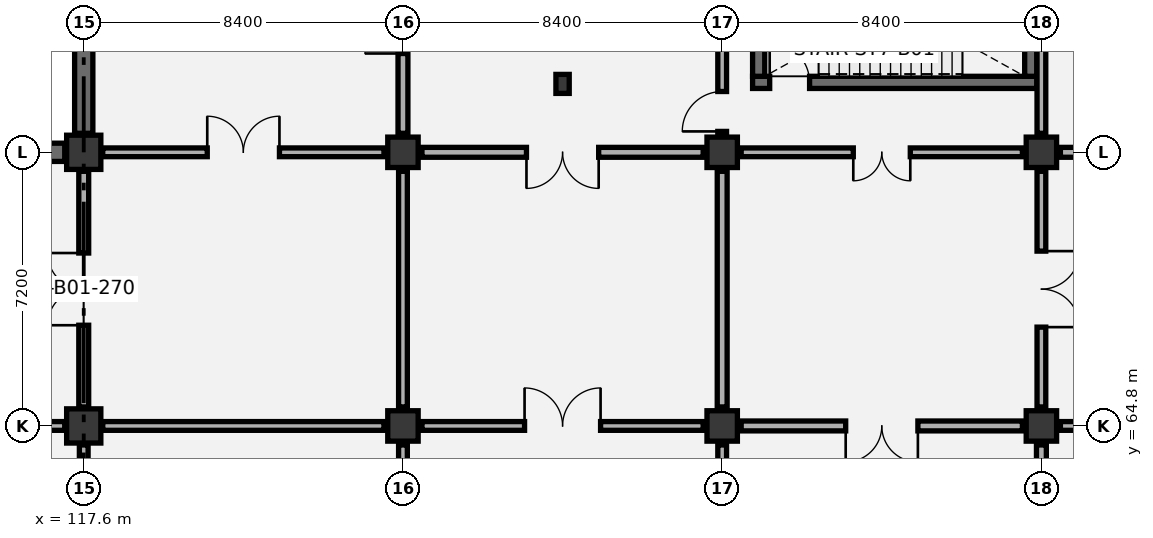
"""IFC4 building model, lengths in metres.
Left out: names, types, materials, properties, quantities, classifications, styles, units other than length and angle.
Written with IfcOpenShell. Run it as: python <this file> out.ifc"""

import sys

from ifc_helpers import new_model, si_unit, direction, frame, frame_2d, origin, origin_2d, place, context, subcontext, project, spatial, rectangle, extrude, element, fill, save


model = new_model("IFC4")
c1 = context("Model", 3, precision=1e-05, world=origin(), true_north=direction((0.0, 1.0)))
c2 = subcontext(c1, "Body", "Model", "MODEL_VIEW")
j1 = project(units=[si_unit("LENGTHUNIT", "METRE"), si_unit("PLANEANGLEUNIT", "RADIAN")], contexts=[c1])
p1 = place(None, origin())
s1 = spatial("IfcSite", under=j1, at=p1, CompositionType="ELEMENT")
p2 = place(p1, origin())
s2 = spatial("IfcBuilding", under=s1, at=p2, CompositionType="ELEMENT")
p3 = place(p2, frame((0.0, 0.0, -4.8)))
s3 = spatial("IfcBuildingStorey", under=s2, at=p3, CompositionType="ELEMENT", Elevation=-4.8)
for number, where, z_axis, x_axis in (
    (1, (117.6, 64.8, 0.0), (0.0, 0.0, 1.0), (1.0, 0.0, 0.0)),
    (2, (117.6, 72.0, 0.0), (0.0, 0.0, 1.0), (1.0, 0.0, 0.0)),
):
    element("IfcColumn", number, at=place(p3, frame(where, z_axis=z_axis, x_axis=x_axis)), inside=s3, PredefinedType="COLUMN", context=c2, shape_type="SweptSolid", body=[
        extrude(rectangle(XDim=0.9, YDim=0.9, at=origin_2d()), origin(), (0.0, 0.0, 1.0), 4.8),
    ])
for number, where, z_axis, x_axis in (
    (3, (126.0, 64.8, 0.0), (0.0, 0.0, 1.0), (1.0, 0.0, 0.0)),
    (4, (126.0, 72.0, 0.0), (0.0, 0.0, 1.0), (1.0, 0.0, 0.0)),
    (5, (134.4, 64.8, 0.0), (0.0, 0.0, 1.0), (1.0, 0.0, 0.0)),
    (6, (134.4, 72.0, 0.0), (0.0, 0.0, 1.0), (1.0, 0.0, 0.0)),
    (7, (142.8, 64.8, 0.0), (0.0, 0.0, 1.0), (1.0, 0.0, 0.0)),
    (8, (142.8, 72.0, 0.0), (0.0, 0.0, 1.0), (1.0, 0.0, 0.0)),
):
    element("IfcColumn", number, at=place(p3, frame(where, z_axis=z_axis, x_axis=x_axis)), inside=s3, PredefinedType="COLUMN", context=c2, shape_type="SweptSolid", body=[
        extrude(rectangle(XDim=0.8, YDim=0.8, at=origin_2d()), origin(), (0.0, 0.0, 1.0), 4.8),
    ])
p4 = place(p3, frame((130.2, 73.8, 0.0), z_axis=(0.0, 0.0, 1.0), x_axis=(1.0, 0.0, 0.0)))
e9 = element("IfcColumn", 9, at=p4, inside=s3, PredefinedType="PILASTER", context=c2, shape_type="SweptSolid", body=[
    extrude(rectangle(XDim=0.35, YDim=0.5, at=origin_2d()), origin(), (0.0, 0.0, 1.0), 4.8),
])
p5 = place(p3, frame((109.7, 72.0, 0.0), z_axis=(0.0, 0.0, 1.0), x_axis=(1.0, 0.0, 0.0)))
e10 = element("IfcWall", 10, at=p5, inside=s3, PredefinedType="USERDEFINED", context=c2, shape_type="SweptSolid", body=[
    extrude(rectangle(XDim=7.4, YDim=0.48, at=frame_2d((3.7, 0.0))), origin(), (0.0, 0.0, 1.0), 4.45),
])
p6 = place(p3, frame((117.6, 72.5, 0.0), z_axis=(0.0, 0.0, 1.0), x_axis=(0.0, 1.0, 0.0)))
e11 = element("IfcWall", 11, at=p6, inside=s3, PredefinedType="USERDEFINED", context=c2, shape_type="SweptSolid", body=[
    extrude(rectangle(XDim=6.2, YDim=0.48, at=frame_2d((3.1, 0.0))), origin(), (0.0, 0.0, 1.0), 4.575),
])
p7 = place(p3, frame((135.2, 73.84, 0.0), z_axis=(0.0, 0.0, 1.0), x_axis=(1.0, 0.0, 0.0)))
e12 = element("IfcWall", 12, at=p7, inside=s3, PredefinedType="SHEAR", context=c2, shape_type="SweptSolid", body=[
    extrude(rectangle(XDim=7.48, YDim=0.32, at=frame_2d((3.74, 0.0))), origin(), (0.0, 0.0, 1.0), 4.45),
])
p8 = place(p7, frame((0.45, 0.0, 0.0)))
e13 = element("IfcOpeningElement", 13, at=p8, cuts=e12, PredefinedType="OPENING", context=c2, shape_type="SweptSolid", body=[
    extrude(rectangle(XDim=1.05, YDim=2.15, at=frame_2d((0.525, 1.075))), frame((0.0, 0.17, 0.0), z_axis=(0.0, -1.0, 0.0), x_axis=(1.0, 0.0, 0.0)), (0.0, 0.0, 1.0), 0.34),
])
for number, where, z_axis, x_axis in (
    (14, (135.36, 74.0, 0.0), (0.0, 0.0, 1.0), (0.0, 1.0, 0.0)),
    (15, (142.52, 74.0, 0.0), (0.0, 0.0, 1.0), (0.0, 1.0, 0.0)),
):
    element("IfcWall", number, at=place(p3, frame(where, z_axis=z_axis, x_axis=x_axis)), inside=s3, PredefinedType="SHEAR", context=c2, shape_type="SweptSolid", body=[
        extrude(rectangle(XDim=3.8, YDim=0.32, at=frame_2d((1.9, 0.0))), origin(), (0.0, 0.0, 1.0), 4.45),
    ])
p9 = place(p3, frame((117.6, 58.1, 0.0), z_axis=(0.0, 0.0, 1.0), x_axis=(0.0, 1.0, 0.0)))
e16 = element("IfcWall", 16, at=p9, inside=s3, PredefinedType="PARTITIONING", context=c2, shape_type="SweptSolid", body=[
    extrude(rectangle(XDim=6.2, YDim=0.23, at=frame_2d((3.1, 0.0))), origin(), (0.0, 0.0, 1.0), 3.645),
])
p10 = place(p3, frame((109.7, 64.8, 0.0), z_axis=(0.0, 0.0, 1.0), x_axis=(1.0, 0.0, 0.0)))
e17 = element("IfcWall", 17, at=p10, inside=s3, PredefinedType="PARTITIONING", context=c2, shape_type="SweptSolid", body=[
    extrude(rectangle(XDim=7.4, YDim=0.23, at=frame_2d((3.7, 0.0))), origin(), (0.0, 0.0, 1.0), 3.545),
])
p11 = place(p3, frame((117.6, 65.3, 0.0), z_axis=(0.0, 0.0, 1.0), x_axis=(0.0, 1.0, 0.0)))
e18 = element("IfcWall", 18, at=p11, inside=s3, PredefinedType="PARTITIONING", context=c2, shape_type="SweptSolid", body=[
    extrude(rectangle(XDim=6.2, YDim=0.26, at=frame_2d((3.1, 0.0))), origin(), (0.0, 0.0, 1.0), 3.645),
])
p12 = place(p11, frame((2.15, 0.0, 0.0)))
e19 = element("IfcOpeningElement", 19, at=p12, cuts=e18, PredefinedType="OPENING", context=c2, shape_type="SweptSolid", body=[
    extrude(rectangle(XDim=1.9, YDim=2.3, at=frame_2d((0.95, 1.15))), frame((0.0, 0.14, 0.0), z_axis=(0.0, -1.0, 0.0), x_axis=(1.0, 0.0, 0.0)), (0.0, 0.0, 1.0), 0.28),
])
p13 = place(p3, frame((126.0, 58.1, 0.0), z_axis=(0.0, 0.0, 1.0), x_axis=(0.0, 1.0, 0.0)))
e20 = element("IfcWall", 20, at=p13, inside=s3, PredefinedType="PARTITIONING", context=c2, shape_type="SweptSolid", body=[
    extrude(rectangle(XDim=6.2, YDim=0.23, at=frame_2d((3.1, 0.0))), origin(), (0.0, 0.0, 1.0), 3.645),
])
p14 = place(p3, frame((118.1, 64.8, 0.0), z_axis=(0.0, 0.0, 1.0), x_axis=(1.0, 0.0, 0.0)))
e21 = element("IfcWall", 21, at=p14, inside=s3, PredefinedType="PARTITIONING", context=c2, shape_type="SweptSolid", body=[
    extrude(rectangle(XDim=7.4, YDim=0.23, at=frame_2d((3.7, 0.0))), origin(), (0.0, 0.0, 1.0), 3.545),
])
p15 = place(p3, frame((126.0, 65.3, 0.0), z_axis=(0.0, 0.0, 1.0), x_axis=(0.0, 1.0, 0.0)))
e22 = element("IfcWall", 22, at=p15, inside=s3, PredefinedType="PARTITIONING", context=c2, shape_type="SweptSolid", body=[
    extrude(rectangle(XDim=6.2, YDim=0.23, at=frame_2d((3.1, 0.0))), origin(), (0.0, 0.0, 1.0), 3.645),
])
p16 = place(p3, frame((118.1, 72.0, 0.0), z_axis=(0.0, 0.0, 1.0), x_axis=(1.0, 0.0, 0.0)))
e23 = element("IfcWall", 23, at=p16, inside=s3, PredefinedType="PARTITIONING", context=c2, shape_type="SweptSolid", body=[
    extrude(rectangle(XDim=7.4, YDim=0.23, at=frame_2d((3.7, 0.0))), origin(), (0.0, 0.0, 1.0), 3.545),
])
p17 = place(p16, frame((2.75, 0.0, 0.0)))
e24 = element("IfcOpeningElement", 24, at=p17, cuts=e23, PredefinedType="OPENING", context=c2, shape_type="SweptSolid", body=[
    extrude(rectangle(XDim=1.9, YDim=2.3, at=frame_2d((0.95, 1.15))), frame((0.0, 0.125, 0.0), z_axis=(0.0, -1.0, 0.0), x_axis=(1.0, 0.0, 0.0)), (0.0, 0.0, 1.0), 0.25),
])
p18 = place(p3, frame((126.0, 72.5, 0.0), z_axis=(0.0, 0.0, 1.0), x_axis=(0.0, 1.0, 0.0)))
e25 = element("IfcWall", 25, at=p18, inside=s3, PredefinedType="PARTITIONING", context=c2, shape_type="SweptSolid", body=[
    extrude(rectangle(XDim=6.2, YDim=0.26, at=frame_2d((3.1, 0.0))), origin(), (0.0, 0.0, 1.0), 3.645),
])
p19 = place(p18, frame((2.1, 0.0, 0.0)))
e26 = element("IfcOpeningElement", 26, at=p19, cuts=e25, PredefinedType="OPENING", context=c2, shape_type="SweptSolid", body=[
    extrude(rectangle(XDim=2.0, YDim=2.35, at=frame_2d((1.0, 1.175))), frame((0.0, 0.14, 0.0), z_axis=(0.0, -1.0, 0.0), x_axis=(1.0, 0.0, 0.0)), (0.0, 0.0, 1.0), 0.28),
])
p20 = place(p3, frame((134.4, 58.1, 0.0), z_axis=(0.0, 0.0, 1.0), x_axis=(0.0, 1.0, 0.0)))
e27 = element("IfcWall", 27, at=p20, inside=s3, PredefinedType="PARTITIONING", context=c2, shape_type="SweptSolid", body=[
    extrude(rectangle(XDim=6.2, YDim=0.23, at=frame_2d((3.1, 0.0))), origin(), (0.0, 0.0, 1.0), 3.645),
])
p21 = place(p3, frame((126.5, 64.8, 0.0), z_axis=(0.0, 0.0, 1.0), x_axis=(1.0, 0.0, 0.0)))
e28 = element("IfcWall", 28, at=p21, inside=s3, PredefinedType="PARTITIONING", context=c2, shape_type="SweptSolid", body=[
    extrude(rectangle(XDim=7.4, YDim=0.23, at=frame_2d((3.7, 0.0))), origin(), (0.0, 0.0, 1.0), 3.545),
])
p22 = place(p21, frame((2.7, 0.0, 0.0)))
e29 = element("IfcOpeningElement", 29, at=p22, cuts=e28, PredefinedType="OPENING", context=c2, shape_type="SweptSolid", body=[
    extrude(rectangle(XDim=2.0, YDim=2.35, at=frame_2d((1.0, 1.175))), frame((0.0, 0.125, 0.0), z_axis=(0.0, -1.0, 0.0), x_axis=(1.0, 0.0, 0.0)), (0.0, 0.0, 1.0), 0.25),
])
p23 = place(p3, frame((134.4, 65.3, 0.0), z_axis=(0.0, 0.0, 1.0), x_axis=(0.0, 1.0, 0.0)))
e30 = element("IfcWall", 30, at=p23, inside=s3, PredefinedType="PARTITIONING", context=c2, shape_type="SweptSolid", body=[
    extrude(rectangle(XDim=6.2, YDim=0.26, at=frame_2d((3.1, 0.0))), origin(), (0.0, 0.0, 1.0), 3.645),
])
p24 = place(p3, frame((126.5, 72.0, 0.0), z_axis=(0.0, 0.0, 1.0), x_axis=(1.0, 0.0, 0.0)))
e31 = element("IfcWall", 31, at=p24, inside=s3, PredefinedType="PARTITIONING", context=c2, shape_type="SweptSolid", body=[
    extrude(rectangle(XDim=7.4, YDim=0.26, at=frame_2d((3.7, 0.0))), origin(), (0.0, 0.0, 1.0), 3.545),
])
p25 = place(p24, frame((2.75, 0.0, 0.0)))
e32 = element("IfcOpeningElement", 32, at=p25, cuts=e31, PredefinedType="OPENING", context=c2, shape_type="SweptSolid", body=[
    extrude(rectangle(XDim=1.9, YDim=2.3, at=frame_2d((0.95, 1.15))), frame((0.0, 0.14, 0.0), z_axis=(0.0, -1.0, 0.0), x_axis=(1.0, 0.0, 0.0)), (0.0, 0.0, 1.0), 0.28),
])
p26 = place(p3, frame((134.4, 72.5, 0.0), z_axis=(0.0, 0.0, 1.0), x_axis=(0.0, 1.0, 0.0)))
e33 = element("IfcWall", 33, at=p26, inside=s3, PredefinedType="PARTITIONING", context=c2, shape_type="SweptSolid", body=[
    extrude(rectangle(XDim=6.2, YDim=0.23, at=frame_2d((3.1, 0.0))), origin(), (0.0, 0.0, 1.0), 3.645),
])
p27 = place(p26, frame((0.05, 0.0, 0.0)))
e34 = element("IfcOpeningElement", 34, at=p27, cuts=e33, PredefinedType="OPENING", context=c2, shape_type="SweptSolid", body=[
    extrude(rectangle(XDim=1.05, YDim=2.15, at=frame_2d((0.525, 1.075))), frame((0.0, 0.125, 0.0), z_axis=(0.0, -1.0, 0.0), x_axis=(1.0, 0.0, 0.0)), (0.0, 0.0, 1.0), 0.25),
])
p28 = place(p3, frame((142.8, 58.1, 0.0), z_axis=(0.0, 0.0, 1.0), x_axis=(0.0, 1.0, 0.0)))
e35 = element("IfcWall", 35, at=p28, inside=s3, PredefinedType="PARTITIONING", context=c2, shape_type="SweptSolid", body=[
    extrude(rectangle(XDim=6.2, YDim=0.26, at=frame_2d((3.1, 0.0))), origin(), (0.0, 0.0, 1.0), 3.645),
])
p29 = place(p3, frame((134.9, 64.8, 0.0), z_axis=(0.0, 0.0, 1.0), x_axis=(1.0, 0.0, 0.0)))
e36 = element("IfcWall", 36, at=p29, inside=s3, PredefinedType="PARTITIONING", context=c2, shape_type="SweptSolid", body=[
    extrude(rectangle(XDim=7.4, YDim=0.26, at=frame_2d((3.7, 0.0))), origin(), (0.0, 0.0, 1.0), 3.545),
])
p30 = place(p29, frame((2.75, 0.0, 0.0)))
e37 = element("IfcOpeningElement", 37, at=p30, cuts=e36, PredefinedType="OPENING", context=c2, shape_type="SweptSolid", body=[
    extrude(rectangle(XDim=1.9, YDim=2.3, at=frame_2d((0.95, 1.15))), frame((0.0, 0.14, 0.0), z_axis=(0.0, -1.0, 0.0), x_axis=(1.0, 0.0, 0.0)), (0.0, 0.0, 1.0), 0.28),
])
p31 = place(p3, frame((142.8, 65.3, 0.0), z_axis=(0.0, 0.0, 1.0), x_axis=(0.0, 1.0, 0.0)))
e38 = element("IfcWall", 38, at=p31, inside=s3, PredefinedType="PARTITIONING", context=c2, shape_type="SweptSolid", body=[
    extrude(rectangle(XDim=6.2, YDim=0.23, at=frame_2d((3.1, 0.0))), origin(), (0.0, 0.0, 1.0), 3.645),
])
p32 = place(p31, frame((2.1, 0.0, 0.0)))
e39 = element("IfcOpeningElement", 39, at=p32, cuts=e38, PredefinedType="OPENING", context=c2, shape_type="SweptSolid", body=[
    extrude(rectangle(XDim=2.0, YDim=2.35, at=frame_2d((1.0, 1.175))), frame((0.0, 0.125, 0.0), z_axis=(0.0, -1.0, 0.0), x_axis=(1.0, 0.0, 0.0)), (0.0, 0.0, 1.0), 0.25),
])
p33 = place(p3, frame((134.9, 72.0, 0.0), z_axis=(0.0, 0.0, 1.0), x_axis=(1.0, 0.0, 0.0)))
e40 = element("IfcWall", 40, at=p33, inside=s3, PredefinedType="PARTITIONING", context=c2, shape_type="SweptSolid", body=[
    extrude(rectangle(XDim=7.4, YDim=0.23, at=frame_2d((3.7, 0.0))), origin(), (0.0, 0.0, 1.0), 3.545),
])
p34 = place(p33, frame((2.95, 0.0, 0.0)))
e41 = element("IfcOpeningElement", 41, at=p34, cuts=e40, PredefinedType="OPENING", context=c2, shape_type="SweptSolid", body=[
    extrude(rectangle(XDim=1.5, YDim=2.15, at=frame_2d((0.75, 1.075))), frame((0.0, 0.125, 0.0), z_axis=(0.0, -1.0, 0.0), x_axis=(1.0, 0.0, 0.0)), (0.0, 0.0, 1.0), 0.25),
])
p35 = place(p3, frame((142.8, 72.5, 0.0), z_axis=(0.0, 0.0, 1.0), x_axis=(0.0, 1.0, 0.0)))
e42 = element("IfcWall", 42, at=p35, inside=s3, PredefinedType="PARTITIONING", context=c2, shape_type="SweptSolid", body=[
    extrude(rectangle(XDim=6.2, YDim=0.23, at=frame_2d((3.1, 0.0))), origin(), (0.0, 0.0, 1.0), 3.645),
])
p36 = place(p3, frame((143.3, 64.8, 0.0), z_axis=(0.0, 0.0, 1.0), x_axis=(1.0, 0.0, 0.0)))
e43 = element("IfcWall", 43, at=p36, inside=s3, PredefinedType="PARTITIONING", context=c2, shape_type="SweptSolid", body=[
    extrude(rectangle(XDim=7.4, YDim=0.23, at=frame_2d((3.7, 0.0))), origin(), (0.0, 0.0, 1.0), 3.545),
])
p37 = place(p36, frame((2.75, 0.0, 0.0)))
e44 = element("IfcOpeningElement", 44, at=p37, cuts=e43, PredefinedType="OPENING", context=c2, shape_type="SweptSolid", body=[
    extrude(rectangle(XDim=1.9, YDim=2.3, at=frame_2d((0.95, 1.15))), frame((0.0, 0.125, 0.0), z_axis=(0.0, -1.0, 0.0), x_axis=(1.0, 0.0, 0.0)), (0.0, 0.0, 1.0), 0.25),
])
p38 = place(p3, frame((143.3, 72.0, 0.0), z_axis=(0.0, 0.0, 1.0), x_axis=(1.0, 0.0, 0.0)))
e45 = element("IfcWall", 45, at=p38, inside=s3, PredefinedType="PARTITIONING", context=c2, shape_type="SweptSolid", body=[
    extrude(rectangle(XDim=7.4, YDim=0.26, at=frame_2d((3.7, 0.0))), origin(), (0.0, 0.0, 1.0), 3.545),
])
p39 = place(p38, frame((2.75, 0.0, 0.0)))
e46 = element("IfcOpeningElement", 46, at=p39, cuts=e45, PredefinedType="OPENING", context=c2, shape_type="SweptSolid", body=[
    extrude(rectangle(XDim=1.9, YDim=2.3, at=frame_2d((0.95, 1.15))), frame((0.0, 0.14, 0.0), z_axis=(0.0, -1.0, 0.0), x_axis=(1.0, 0.0, 0.0)), (0.0, 0.0, 1.0), 0.28),
])
p40 = place(p8, origin())
e47 = element("IfcDoor", 47, at=p40, inside=s3, OperationType="SINGLE_SWING_LEFT", PredefinedType="DOOR", context=c2, shape_type="SweptSolid", body=[
    extrude(rectangle(XDim=1.05, YDim=2.15, at=frame_2d((0.525, 1.075))), frame((0.0, 0.025, 0.0), z_axis=(0.0, -1.0, 0.0), x_axis=(1.0, 0.0, 0.0)), (0.0, 0.0, 1.0), 0.05),
])
fill(e13, e47)
p41 = place(p12, origin())
e48 = element("IfcDoor", 48, at=p41, inside=s3, OperationType="DOUBLE_DOOR_SINGLE_SWING", PredefinedType="DOOR", context=c2, shape_type="SweptSolid", body=[
    extrude(rectangle(XDim=1.9, YDim=2.3, at=frame_2d((0.95, 1.15))), frame((0.0, 0.025, 0.0), z_axis=(0.0, -1.0, 0.0), x_axis=(1.0, 0.0, 0.0)), (0.0, 0.0, 1.0), 0.05),
])
fill(e19, e48)
p42 = place(p17, origin())
e49 = element("IfcDoor", 49, at=p42, inside=s3, OperationType="DOUBLE_DOOR_SINGLE_SWING", PredefinedType="DOOR", context=c2, shape_type="SweptSolid", body=[
    extrude(rectangle(XDim=1.9, YDim=2.3, at=frame_2d((0.95, 1.15))), frame((0.0, 0.025, 0.0), z_axis=(0.0, -1.0, 0.0), x_axis=(1.0, 0.0, 0.0)), (0.0, 0.0, 1.0), 0.05),
])
fill(e24, e49)
p43 = place(p19, origin())
e50 = element("IfcDoor", 50, at=p43, inside=s3, OperationType="DOUBLE_DOOR_SINGLE_SWING", PredefinedType="DOOR", context=c2, shape_type="SweptSolid", body=[
    extrude(rectangle(XDim=2.0, YDim=2.35, at=frame_2d((1.0, 1.175))), frame((0.0, 0.025, 0.0), z_axis=(0.0, -1.0, 0.0), x_axis=(1.0, 0.0, 0.0)), (0.0, 0.0, 1.0), 0.05),
])
fill(e26, e50)
p44 = place(p22, origin())
e51 = element("IfcDoor", 51, at=p44, inside=s3, OperationType="DOUBLE_DOOR_SINGLE_SWING", PredefinedType="DOOR", context=c2, shape_type="SweptSolid", body=[
    extrude(rectangle(XDim=2.0, YDim=2.35, at=frame_2d((1.0, 1.175))), frame((0.0, 0.025, 0.0), z_axis=(0.0, -1.0, 0.0), x_axis=(1.0, 0.0, 0.0)), (0.0, 0.0, 1.0), 0.05),
])
fill(e29, e51)
p45 = place(p25, frame((1.9, 0.0, 0.0), z_axis=(0.0, 0.0, 1.0), x_axis=(-1.0, 0.0, 0.0)))
e52 = element("IfcDoor", 52, at=p45, inside=s3, OperationType="DOUBLE_DOOR_SINGLE_SWING", PredefinedType="DOOR", context=c2, shape_type="SweptSolid", body=[
    extrude(rectangle(XDim=1.9, YDim=2.3, at=frame_2d((0.95, 1.15))), frame((0.0, 0.025, 0.0), z_axis=(0.0, -1.0, 0.0), x_axis=(1.0, 0.0, 0.0)), (0.0, 0.0, 1.0), 0.05),
])
fill(e32, e52)
p46 = place(p27, origin())
e53 = element("IfcDoor", 53, at=p46, inside=s3, OperationType="SINGLE_SWING_LEFT", PredefinedType="DOOR", context=c2, shape_type="SweptSolid", body=[
    extrude(rectangle(XDim=1.05, YDim=2.15, at=frame_2d((0.525, 1.075))), frame((0.0, 0.025, 0.0), z_axis=(0.0, -1.0, 0.0), x_axis=(1.0, 0.0, 0.0)), (0.0, 0.0, 1.0), 0.05),
])
fill(e34, e53)
p47 = place(p30, frame((1.9, 0.0, 0.0), z_axis=(0.0, 0.0, 1.0), x_axis=(-1.0, 0.0, 0.0)))
e54 = element("IfcDoor", 54, at=p47, inside=s3, OperationType="DOUBLE_DOOR_SINGLE_SWING", PredefinedType="DOOR", context=c2, shape_type="SweptSolid", body=[
    extrude(rectangle(XDim=1.9, YDim=2.3, at=frame_2d((0.95, 1.15))), frame((0.0, 0.025, 0.0), z_axis=(0.0, -1.0, 0.0), x_axis=(1.0, 0.0, 0.0)), (0.0, 0.0, 1.0), 0.05),
])
fill(e37, e54)
p48 = place(p32, frame((2.0, 0.0, 0.0), z_axis=(0.0, 0.0, 1.0), x_axis=(-1.0, 0.0, 0.0)))
e55 = element("IfcDoor", 55, at=p48, inside=s3, OperationType="DOUBLE_DOOR_SINGLE_SWING", PredefinedType="DOOR", context=c2, shape_type="SweptSolid", body=[
    extrude(rectangle(XDim=2.0, YDim=2.35, at=frame_2d((1.0, 1.175))), frame((0.0, 0.025, 0.0), z_axis=(0.0, -1.0, 0.0), x_axis=(1.0, 0.0, 0.0)), (0.0, 0.0, 1.0), 0.05),
])
fill(e39, e55)
p49 = place(p34, frame((1.5, 0.0, 0.0), z_axis=(0.0, 0.0, 1.0), x_axis=(-1.0, 0.0, 0.0)))
e56 = element("IfcDoor", 56, at=p49, inside=s3, OperationType="DOUBLE_DOOR_SINGLE_SWING", PredefinedType="DOOR", context=c2, shape_type="SweptSolid", body=[
    extrude(rectangle(XDim=1.5, YDim=2.15, at=frame_2d((0.75, 1.075))), frame((0.0, 0.025, 0.0), z_axis=(0.0, -1.0, 0.0), x_axis=(1.0, 0.0, 0.0)), (0.0, 0.0, 1.0), 0.05),
])
fill(e41, e56)
save(model, sys.argv[1])
